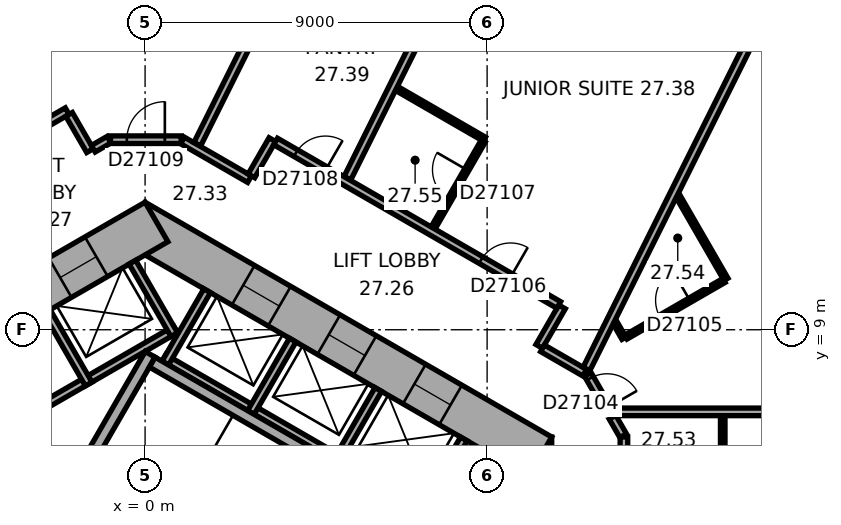
"""IFC4 building model, lengths in metres.
Left out: names, types, materials, properties, quantities, classifications, styles, units other than length and angle.
Written with IfcOpenShell. Run it as: python <this file> out.ifc"""

import sys

from ifc_helpers import new_model, si_unit, direction, frame, frame_2d, origin, place, context, subcontext, project, spatial, rectangle, extrude, element, fill, save


model = new_model("IFC4")
c1 = context("Model", 3, precision=1e-05, world=origin(), true_north=direction((0.0, 1.0)))
c2 = subcontext(c1, "Body", "Model", "MODEL_VIEW")
j1 = project(units=[si_unit("LENGTHUNIT", "METRE"), si_unit("PLANEANGLEUNIT", "RADIAN")], contexts=[c1])
p1 = place(None, origin())
s1 = spatial("IfcSite", under=j1, at=p1, CompositionType="ELEMENT")
p2 = place(p1, origin())
s2 = spatial("IfcBuilding", under=s1, at=p2, CompositionType="ELEMENT")
p3 = place(p2, frame((0.0, 0.0, 113.3)))
s3 = spatial("IfcBuildingStorey", under=s2, at=p3, CompositionType="ELEMENT", Elevation=113.3)
p4 = place(p3, frame((10.1, -6.177, 0.0), z_axis=(0.0, 0.0, 1.0), x_axis=(0.0, 1.0, 0.0)))
e1 = element("IfcWall", 1, at=p4, inside=s3, PredefinedType="SHEAR", context=c2, shape_type="SweptSolid", body=[
    extrude(rectangle(XDim=12.355, YDim=1.2, at=frame_2d((6.177, 0.0))), origin(), (0.0, 0.0, 1.0), 3.3),
])
p5 = place(p4, frame((6.378, 0.0, 0.0)))
e2 = element("IfcOpeningElement", 2, at=p5, cuts=e1, PredefinedType="OPENING", context=c2, shape_type="SweptSolid", body=[
    extrude(rectangle(XDim=1.5, YDim=2.1, at=frame_2d((0.75, 1.05))), frame((0.0, 0.61, 0.0), z_axis=(0.0, -1.0, 0.0), x_axis=(1.0, 0.0, 0.0)), (0.0, 0.0, 1.0), 1.22),
])
p6 = place(p4, frame((1.828, 0.0, 0.0)))
e3 = element("IfcOpeningElement", 3, at=p6, cuts=e1, PredefinedType="OPENING", context=c2, shape_type="SweptSolid", body=[
    extrude(rectangle(XDim=1.1, YDim=2.1, at=frame_2d((0.55, 1.05))), frame((0.0, 0.61, 0.0), z_axis=(0.0, -1.0, 0.0), x_axis=(1.0, 0.0, 0.0)), (0.0, 0.0, 1.0), 1.22),
])
p7 = place(p4, frame((4.427, 0.0, 0.0)))
e4 = element("IfcOpeningElement", 4, at=p7, cuts=e1, PredefinedType="OPENING", context=c2, shape_type="SweptSolid", body=[
    extrude(rectangle(XDim=1.1, YDim=2.1, at=frame_2d((0.55, 1.05))), frame((0.0, 0.61, 0.0), z_axis=(0.0, -1.0, 0.0), x_axis=(1.0, 0.0, 0.0)), (0.0, 0.0, 1.0), 1.22),
])
p8 = place(p3, frame((10.4, 5.658, 0.0), z_axis=(0.0, 0.0, 1.0), x_axis=(-0.866021384402, 0.500006961711, 0.0)))
e5 = element("IfcWall", 5, at=p8, inside=s3, PredefinedType="SHEAR", context=c2, shape_type="SweptSolid", body=[
    extrude(rectangle(XDim=12.355, YDim=1.2, at=frame_2d((6.178, 0.0))), origin(), (0.0, 0.0, 1.0), 3.3),
])
p9 = place(p8, frame((2.728, 0.0, 0.0)))
e6 = element("IfcOpeningElement", 6, at=p9, cuts=e5, PredefinedType="OPENING", context=c2, shape_type="SweptSolid", body=[
    extrude(rectangle(XDim=1.1, YDim=2.1, at=frame_2d((0.55, 1.05))), frame((0.0, 0.61, 0.0), z_axis=(0.0, -1.0, 0.0), x_axis=(1.0, 0.0, 0.0)), (0.0, 0.0, 1.0), 1.22),
])
p10 = place(p8, frame((5.328, 0.0, 0.0)))
e7 = element("IfcOpeningElement", 7, at=p10, cuts=e5, PredefinedType="OPENING", context=c2, shape_type="SweptSolid", body=[
    extrude(rectangle(XDim=1.1, YDim=2.1, at=frame_2d((0.55, 1.05))), frame((0.0, 0.61, 0.0), z_axis=(0.0, -1.0, 0.0), x_axis=(1.0, 0.0, 0.0)), (0.0, 0.0, 1.0), 1.22),
])
p11 = place(p8, frame((7.928, 0.0, 0.0)))
e8 = element("IfcOpeningElement", 8, at=p11, cuts=e5, PredefinedType="OPENING", context=c2, shape_type="SweptSolid", body=[
    extrude(rectangle(XDim=1.1, YDim=2.1, at=frame_2d((0.55, 1.05))), frame((0.0, 0.61, 0.0), z_axis=(0.0, -1.0, 0.0), x_axis=(1.0, 0.0, 0.0)), (0.0, 0.0, 1.0), 1.22),
])
p12 = place(p3, frame((0.3, 11.836, 0.0), z_axis=(0.0, 0.0, 1.0), x_axis=(-0.866021384402, -0.500006961711, 0.0)))
e9 = element("IfcWall", 9, at=p12, inside=s3, PredefinedType="SHEAR", context=c2, shape_type="SweptSolid", body=[
    extrude(rectangle(XDim=12.355, YDim=1.2, at=frame_2d((6.178, 0.0))), origin(), (0.0, 0.0, 1.0), 3.3),
])
p13 = place(p12, frame((6.378, 0.0, 0.0)))
e10 = element("IfcOpeningElement", 10, at=p13, cuts=e9, PredefinedType="OPENING", context=c2, shape_type="SweptSolid", body=[
    extrude(rectangle(XDim=1.5, YDim=2.1, at=frame_2d((0.75, 1.05))), frame((0.0, 0.61, 0.0), z_axis=(0.0, -1.0, 0.0), x_axis=(1.0, 0.0, 0.0)), (0.0, 0.0, 1.0), 1.22),
])
p14 = place(p12, frame((1.828, 0.0, 0.0)))
e11 = element("IfcOpeningElement", 11, at=p14, cuts=e9, PredefinedType="OPENING", context=c2, shape_type="SweptSolid", body=[
    extrude(rectangle(XDim=1.1, YDim=2.1, at=frame_2d((0.55, 1.05))), frame((0.0, 0.61, 0.0), z_axis=(0.0, -1.0, 0.0), x_axis=(1.0, 0.0, 0.0)), (0.0, 0.0, 1.0), 1.22),
])
p15 = place(p3, frame((20.63, 15.47, 0.0), z_axis=(0.0, 0.0, 1.0), x_axis=(-0.894934518609, 0.446197498203, 0.0)))
e12 = element("IfcWall", 12, at=p15, inside=s3, PredefinedType="STANDARD", context=c2, shape_type="SweptSolid", body=[
    extrude(rectangle(XDim=21.246, YDim=0.2, at=frame_2d((10.623, 0.0))), origin(), (0.0, 0.0, 1.0), 3.3),
])
p16 = place(p15, frame((1.553, 0.0, 0.8)))
e13 = element("IfcOpeningElement", 13, at=p16, cuts=e12, PredefinedType="OPENING", context=c2, shape_type="SweptSolid", body=[
    extrude(rectangle(XDim=2.4, YDim=1.7, at=frame_2d((1.2, 0.85))), frame((0.0, 0.11, 0.0), z_axis=(0.0, -1.0, 0.0), x_axis=(1.0, 0.0, 0.0)), (0.0, 0.0, 1.0), 0.22),
])
p17 = place(p15, frame((5.488, 0.0, 0.8)))
e14 = element("IfcOpeningElement", 14, at=p17, cuts=e12, PredefinedType="OPENING", context=c2, shape_type="SweptSolid", body=[
    extrude(rectangle(XDim=2.4, YDim=1.7, at=frame_2d((1.2, 0.85))), frame((0.0, 0.11, 0.0), z_axis=(0.0, -1.0, 0.0), x_axis=(1.0, 0.0, 0.0)), (0.0, 0.0, 1.0), 0.22),
])
p18 = place(p15, frame((9.422, 0.0, 0.8)))
e15 = element("IfcOpeningElement", 15, at=p18, cuts=e12, PredefinedType="OPENING", context=c2, shape_type="SweptSolid", body=[
    extrude(rectangle(XDim=2.4, YDim=1.7, at=frame_2d((1.2, 0.85))), frame((0.0, 0.11, 0.0), z_axis=(0.0, -1.0, 0.0), x_axis=(1.0, 0.0, 0.0)), (0.0, 0.0, 1.0), 0.22),
])
p19 = place(p15, frame((13.357, 0.0, 0.8)))
e16 = element("IfcOpeningElement", 16, at=p19, cuts=e12, PredefinedType="OPENING", context=c2, shape_type="SweptSolid", body=[
    extrude(rectangle(XDim=2.4, YDim=1.7, at=frame_2d((1.2, 0.85))), frame((0.0, 0.11, 0.0), z_axis=(0.0, -1.0, 0.0), x_axis=(1.0, 0.0, 0.0)), (0.0, 0.0, 1.0), 0.22),
])
p20 = place(p15, frame((17.292, 0.0, 0.8)))
e17 = element("IfcOpeningElement", 17, at=p20, cuts=e12, PredefinedType="OPENING", context=c2, shape_type="SweptSolid", body=[
    extrude(rectangle(XDim=2.4, YDim=1.7, at=frame_2d((1.2, 0.85))), frame((0.0, 0.11, 0.0), z_axis=(0.0, -1.0, 0.0), x_axis=(1.0, 0.0, 0.0)), (0.0, 0.0, 1.0), 0.22),
])
p21 = place(p3, frame((7.424, 4.259, 0.0), z_axis=(0.0, 0.0, 1.0), x_axis=(-0.866026010844, 0.49999894854, 0.0)))
e18 = element("IfcWall", 18, at=p21, inside=s3, PredefinedType="PARTITIONING", context=c2, shape_type="SweptSolid", body=[
    extrude(rectangle(XDim=8.0, YDim=0.2, at=frame_2d((4.0, 0.0))), origin(), (0.0, 0.0, 1.0), 3.05),
])
for number, where, z_axis, x_axis in (
    (19, (7.287, 4.222, 0.0), (0.0, 0.0, 1.0), (0.5, 0.866, 0.0)),
    (20, (5.036, 5.522, 0.0), (0.0, 0.0, 1.0), (0.5, 0.866, 0.0)),
    (21, (2.784, 6.822, 0.0), (0.0, 0.0, 1.0), (0.5, 0.866, 0.0)),
    (22, (0.532, 8.122, 0.0), (0.0, 0.0, 1.0), (0.5, 0.866, 0.0)),
):
    element("IfcWall", number, at=place(p3, frame(where, z_axis=z_axis, x_axis=x_axis)), inside=s3, PredefinedType="PARTITIONING", context=c2, shape_type="SweptSolid", body=[
        extrude(rectangle(XDim=2.2, YDim=0.2, at=frame_2d((1.1, 0.0))), origin(), (0.0, 0.0, 1.0), 3.05),
    ])
p22 = place(p3, frame((0.803, 9.009, 0.0), z_axis=(0.0, 0.0, 1.0), x_axis=(-0.866028230842, -0.499995103361, 0.0)))
e23 = element("IfcWall", 23, at=p22, inside=s3, PredefinedType="PARTITIONING", context=c2, shape_type="SweptSolid", body=[
    extrude(rectangle(XDim=5.4, YDim=0.2, at=frame_2d((2.7, 0.0))), origin(), (0.0, 0.0, 1.0), 3.05),
])
p23 = place(p3, frame((0.767, 8.872, 0.0), z_axis=(0.0, 0.0, 1.0), x_axis=(-0.499994660107, 0.866028486751, 0.0)))
e24 = element("IfcWall", 24, at=p23, inside=s3, PredefinedType="PARTITIONING", context=c2, shape_type="SweptSolid", body=[
    extrude(rectangle(XDim=2.2, YDim=0.2, at=frame_2d((1.1, 0.0))), origin(), (0.0, 0.0, 1.0), 3.05),
])
p24 = place(p3, frame((-1.485, 7.572, 0.0), z_axis=(0.0, 0.0, 1.0), x_axis=(-0.50002983664, 0.866008176907, 0.0)))
e25 = element("IfcWall", 25, at=p24, inside=s3, PredefinedType="PARTITIONING", context=c2, shape_type="SweptSolid", body=[
    extrude(rectangle(XDim=2.2, YDim=0.2, at=frame_2d((1.1, 0.0))), origin(), (0.0, 0.0, 1.0), 3.05),
])
p25 = place(p3, frame((-2.216, 4.282, 0.0), z_axis=(0.0, 0.0, 1.0), x_axis=(0.499977259774, 0.866038532462, 0.0)))
e26 = element("IfcWall", 26, at=p25, inside=s3, PredefinedType="SHEAR", context=c2, shape_type="SweptSolid", body=[
    extrude(rectangle(XDim=4.7, YDim=0.3, at=frame_2d((2.35, 0.0))), origin(), (0.0, 0.0, 1.0), 3.05),
])
p26 = place(p3, frame((6.303, 4.617, 0.0), z_axis=(0.0, 0.0, 1.0), x_axis=(-0.866027801685, 0.499995846692, 0.0)))
e27 = element("IfcWall", 27, at=p26, inside=s3, PredefinedType="SHEAR", context=c2, shape_type="SweptSolid", body=[
    extrude(rectangle(XDim=7.06, YDim=0.3, at=frame_2d((3.53, 0.0))), origin(), (0.0, 0.0, 1.0), 3.05),
])
p27 = place(p3, frame((-2.05, 14.752, 0.0), z_axis=(0.0, 0.0, 1.0), x_axis=(-0.866030936828, -0.499990416364, 0.0)))
e28 = element("IfcWall", 28, at=p27, inside=s3, PredefinedType="PARTITIONING", context=c2, shape_type="SweptSolid", body=[
    extrude(rectangle(XDim=3.102, YDim=0.2, at=frame_2d((1.551, 0.0))), origin(), (0.0, 0.0, 1.0), 3.05),
])
p28 = place(p3, frame((-1.449, 13.712, 0.0), z_axis=(0.0, 0.0, 1.0), x_axis=(-0.499978356969, 0.866037899034, 0.0)))
e29 = element("IfcWall", 29, at=p28, inside=s3, PredefinedType="PARTITIONING", context=c2, shape_type="SweptSolid", body=[
    extrude(rectangle(XDim=1.101, YDim=0.2, at=frame_2d((0.551, 0.0))), origin(), (0.0, 0.0, 1.0), 3.05),
])
p29 = place(p3, frame((-0.95, 14.001, 0.0), z_axis=(0.0, 0.0, 1.0), x_axis=(-0.86609177584, -0.499885022602, 0.0)))
e30 = element("IfcWall", 30, at=p29, inside=s3, PredefinedType="PARTITIONING", context=c2, shape_type="SweptSolid", body=[
    extrude(rectangle(XDim=0.477, YDim=0.2, at=frame_2d((0.238, 0.0))), origin(), (0.0, 0.0, 1.0), 3.05),
])
p30 = place(p3, frame((0.95, 14.001, 0.0), z_axis=(0.0, 0.0, 1.0), x_axis=(-1.0, 0.0, 0.0)))
e31 = element("IfcWall", 31, at=p30, inside=s3, PredefinedType="PARTITIONING", context=c2, shape_type="SweptSolid", body=[
    extrude(rectangle(XDim=1.86, YDim=0.2, at=frame_2d((0.93, 0.0))), origin(), (0.0, 0.0, 1.0), 3.05),
])
p31 = place(p30, frame((0.43, 0.0, 0.0)))
e32 = element("IfcOpeningElement", 32, at=p31, cuts=e31, PredefinedType="OPENING", context=c2, shape_type="SweptSolid", body=[
    extrude(rectangle(XDim=1.0, YDim=2.1, at=frame_2d((0.5, 1.05))), frame((0.0, 0.11, 0.0), z_axis=(0.0, -1.0, 0.0), x_axis=(1.0, 0.0, 0.0)), (0.0, 0.0, 1.0), 0.22),
])
p32 = place(p3, frame((2.748, 12.962, 0.0), z_axis=(0.0, 0.0, 1.0), x_axis=(-0.866013897511, 0.50001992892, 0.0)))
e33 = element("IfcWall", 33, at=p32, inside=s3, PredefinedType="PARTITIONING", context=c2, shape_type="SweptSolid", body=[
    extrude(rectangle(XDim=2.037, YDim=0.2, at=frame_2d((1.018, 0.0))), origin(), (0.0, 0.0, 1.0), 3.05),
])
p33 = place(p3, frame((3.349, 14.002, 0.0), z_axis=(0.0, 0.0, 1.0), x_axis=(-0.500074377092, -0.865982457891, 0.0)))
e34 = element("IfcWall", 34, at=p33, inside=s3, PredefinedType="PARTITIONING", context=c2, shape_type="SweptSolid", body=[
    extrude(rectangle(XDim=1.101, YDim=0.2, at=frame_2d((0.55, 0.0))), origin(), (0.0, 0.0, 1.0), 3.05),
])
p34 = place(p3, frame((5.351, 21.859, 0.0), z_axis=(0.0, 0.0, 1.0), x_axis=(-0.446205309328, -0.894930624086, 0.0)))
e35 = element("IfcWall", 35, at=p34, inside=s3, PredefinedType="PARTITIONING", context=c2, shape_type="SweptSolid", body=[
    extrude(rectangle(XDim=8.913, YDim=0.2, at=frame_2d((4.457, 0.0))), origin(), (0.0, 0.0, 1.0), 2.6),
])
p35 = place(p3, frame((6.614, 15.351, 0.0), z_axis=(0.0, 0.0, 1.0), x_axis=(0.866024262117, -0.500001977421, 0.0)))
e36 = element("IfcWall", 36, at=p35, inside=s3, PredefinedType="PARTITIONING", context=c2, shape_type="SweptSolid", body=[
    extrude(rectangle(XDim=2.671, YDim=0.12, at=frame_2d((1.336, 0.0))), origin(), (0.0, 0.0, 1.0), 3.05),
])
p36 = place(p3, frame((8.872, 20.104, 0.0), z_axis=(0.0, 0.0, 1.0), x_axis=(-0.446218378653, -0.894924107706, 0.0)))
e37 = element("IfcWall", 37, at=p36, inside=s3, PredefinedType="PARTITIONING", context=c2, shape_type="SweptSolid", body=[
    extrude(rectangle(XDim=7.95, YDim=0.2, at=frame_2d((3.975, 0.0))), origin(), (0.0, 0.0, 1.0), 3.05),
])
p37 = place(p3, frame((8.897, 13.963, 0.0), z_axis=(0.0, 0.0, 1.0), x_axis=(-0.500048002682, -0.865997687649, 0.0)))
e38 = element("IfcWall", 38, at=p37, inside=s3, PredefinedType="PARTITIONING", context=c2, shape_type="SweptSolid", body=[
    extrude(rectangle(XDim=2.64, YDim=0.12, at=frame_2d((1.32, 0.0))), origin(), (0.0, 0.0, 1.0), 2.6),
])
p38 = place(p37, frame((0.87, 0.0, 0.0)))
e39 = element("IfcOpeningElement", 39, at=p38, cuts=e38, PredefinedType="OPENING", context=c2, shape_type="SweptSolid", body=[
    extrude(rectangle(XDim=0.9, YDim=2.1, at=frame_2d((0.45, 1.05))), frame((0.0, 0.07, 0.0), z_axis=(0.0, -1.0, 0.0), x_axis=(1.0, 0.0, 0.0)), (0.0, 0.0, 1.0), 0.14),
])
p39 = place(p3, frame((10.371, 8.561, 0.0), z_axis=(0.0, 0.0, 1.0), x_axis=(0.499986357472, 0.866033280158, 0.0)))
e40 = element("IfcWall", 40, at=p39, inside=s3, PredefinedType="PARTITIONING", context=c2, shape_type="SweptSolid", body=[
    extrude(rectangle(XDim=1.201, YDim=0.2, at=frame_2d((0.601, 0.0))), origin(), (0.0, 0.0, 1.0), 3.05),
])
p40 = place(p3, frame((10.885, 9.652, 0.0), z_axis=(0.0, 0.0, 1.0), x_axis=(-0.866033868542, 0.499985338323, 0.0)))
e41 = element("IfcWall", 41, at=p40, inside=s3, PredefinedType="PARTITIONING", context=c2, shape_type="SweptSolid", body=[
    extrude(rectangle(XDim=8.602, YDim=0.2, at=frame_2d((4.301, 0.0))), origin(), (0.0, 0.0, 1.0), 3.05),
])
p41 = place(p40, frame((1.464, 0.0, 0.0)))
e42 = element("IfcOpeningElement", 42, at=p41, cuts=e41, PredefinedType="OPENING", context=c2, shape_type="SweptSolid", body=[
    extrude(rectangle(XDim=0.9, YDim=2.1, at=frame_2d((0.45, 1.05))), frame((0.0, 0.11, 0.0), z_axis=(0.0, -1.0, 0.0), x_axis=(1.0, 0.0, 0.0)), (0.0, 0.0, 1.0), 0.22),
])
p42 = place(p40, frame((7.09, 0.0, 0.0)))
e43 = element("IfcOpeningElement", 43, at=p42, cuts=e41, PredefinedType="OPENING", context=c2, shape_type="SweptSolid", body=[
    extrude(rectangle(XDim=0.9, YDim=2.1, at=frame_2d((0.45, 1.05))), frame((0.0, 0.11, 0.0), z_axis=(0.0, -1.0, 0.0), x_axis=(1.0, 0.0, 0.0)), (0.0, 0.0, 1.0), 0.22),
])
p43 = place(p3, frame((11.566, 7.871, 0.0), z_axis=(0.0, 0.0, 1.0), x_axis=(-0.866004557827, 0.500036104519, 0.0)))
e44 = element("IfcWall", 44, at=p43, inside=s3, PredefinedType="PARTITIONING", context=c2, shape_type="SweptSolid", body=[
    extrude(rectangle(XDim=1.28, YDim=0.2, at=frame_2d((0.64, 0.0))), origin(), (0.0, 0.0, 1.0), 3.05),
])
p44 = place(p3, frame((12.218, 6.839, 0.0), z_axis=(0.0, 0.0, 1.0), x_axis=(-0.500044870432, 0.865999496279, 0.0)))
e45 = element("IfcWall", 45, at=p44, inside=s3, PredefinedType="PARTITIONING", context=c2, shape_type="SweptSolid", body=[
    extrude(rectangle(XDim=1.136, YDim=0.2, at=frame_2d((0.568, 0.0))), origin(), (0.0, 0.0, 1.0), 3.05),
])
p45 = place(p44, frame((0.118, 0.0, 0.0)))
e46 = element("IfcOpeningElement", 46, at=p45, cuts=e45, PredefinedType="OPENING", context=c2, shape_type="SweptSolid", body=[
    extrude(rectangle(XDim=0.9, YDim=2.1, at=frame_2d((0.45, 1.05))), frame((0.0, 0.11, 0.0), z_axis=(0.0, -1.0, 0.0), x_axis=(1.0, 0.0, 0.0)), (0.0, 0.0, 1.0), 0.22),
])
p46 = place(p3, frame((12.58, 6.212, 0.0), z_axis=(0.0, 0.0, 1.0), x_axis=(-0.499936258447, 0.86606220186, 0.0)))
e47 = element("IfcWall", 47, at=p46, inside=s3, PredefinedType="PARTITIONING", context=c2, shape_type="SweptSolid", body=[
    extrude(rectangle(XDim=0.56, YDim=0.2, at=frame_2d((0.28, 0.0))), origin(), (0.0, 0.0, 1.0), 3.05),
])
p47 = place(p3, frame((12.6, 3.004, 0.0), z_axis=(0.0, 0.0, 1.0), x_axis=(0.0, 1.0, 0.0)))
e48 = element("IfcWall", 48, at=p47, inside=s3, PredefinedType="PARTITIONING", context=c2, shape_type="SweptSolid", body=[
    extrude(rectangle(XDim=3.173, YDim=0.2, at=frame_2d((1.586, 0.0))), origin(), (0.0, 0.0, 1.0), 3.05),
])
p48 = place(p47, frame((0.225, 0.0, 0.0)))
e49 = element("IfcOpeningElement", 49, at=p48, cuts=e48, PredefinedType="OPENING", context=c2, shape_type="SweptSolid", body=[
    extrude(rectangle(XDim=0.9, YDim=2.1, at=frame_2d((0.45, 1.05))), frame((0.0, 0.11, 0.0), z_axis=(0.0, -1.0, 0.0), x_axis=(1.0, 0.0, 0.0)), (0.0, 0.0, 1.0), 0.22),
])
p49 = place(p3, frame((12.601, 8.776, 0.0), z_axis=(0.0, 0.0, 1.0), x_axis=(-0.500166486798, 0.865929261247, 0.0)))
e50 = element("IfcWall", 50, at=p49, inside=s3, PredefinedType="PARTITIONING", context=c2, shape_type="SweptSolid", body=[
    extrude(rectangle(XDim=0.476, YDim=0.12, at=frame_2d((0.238, 0.0))), origin(), (0.0, 0.0, 1.0), 3.05),
])
p50 = place(p3, frame((14.022, 12.515, 0.0), z_axis=(0.0, 0.0, 1.0), x_axis=(0.499962146402, -0.866047257466, 0.0)))
e51 = element("IfcWall", 51, at=p50, inside=s3, PredefinedType="PARTITIONING", context=c2, shape_type="SweptSolid", body=[
    extrude(rectangle(XDim=2.528, YDim=0.12, at=frame_2d((1.264, 0.0))), origin(), (0.0, 0.0, 1.0), 3.05),
])
p51 = place(p3, frame((15.2, 6.739, 0.0), z_axis=(0.0, 0.0, 1.0), x_axis=(0.0, -1.0, 0.0)))
e52 = element("IfcWall", 52, at=p51, inside=s3, PredefinedType="PARTITIONING", context=c2, shape_type="SweptSolid", body=[
    extrude(rectangle(XDim=2.274, YDim=0.12, at=frame_2d((1.137, 0.0))), origin(), (0.0, 0.0, 1.0), 3.05),
])
p52 = place(p3, frame((15.233, 10.296, 0.0), z_axis=(0.0, 0.0, 1.0), x_axis=(-0.866010940986, -0.500025049464, 0.0)))
e53 = element("IfcWall", 53, at=p52, inside=s3, PredefinedType="PARTITIONING", context=c2, shape_type="SweptSolid", body=[
    extrude(rectangle(XDim=2.98, YDim=0.12, at=frame_2d((1.49, 0.0))), origin(), (0.0, 0.0, 1.0), 3.05),
])
p53 = place(p52, frame((1.04, 0.0, 0.0)))
e54 = element("IfcOpeningElement", 54, at=p53, cuts=e53, PredefinedType="OPENING", context=c2, shape_type="SweptSolid", body=[
    extrude(rectangle(XDim=0.9, YDim=2.1, at=frame_2d((0.45, 1.05))), frame((0.0, 0.07, 0.0), z_axis=(0.0, -1.0, 0.0), x_axis=(1.0, 0.0, 0.0)), (0.0, 0.0, 1.0), 0.14),
])
p54 = place(p3, frame((15.915, 16.592, 0.0), z_axis=(0.0, 0.0, 1.0), x_axis=(-0.446199736347, -0.894933402709, 0.0)))
e55 = element("IfcWall", 55, at=p54, inside=s3, PredefinedType="PARTITIONING", context=c2, shape_type="SweptSolid", body=[
    extrude(rectangle(XDim=9.635, YDim=0.2, at=frame_2d((4.817, 0.0))), origin(), (0.0, 0.0, 1.0), 3.05),
])
p55 = place(p3, frame((21.95, 6.839, 0.0), z_axis=(0.0, 0.0, 1.0), x_axis=(-1.0, 0.0, 0.0)))
e56 = element("IfcWall", 56, at=p55, inside=s3, PredefinedType="PARTITIONING", context=c2, shape_type="SweptSolid", body=[
    extrude(rectangle(XDim=9.65, YDim=0.2, at=frame_2d((4.825, 0.0))), origin(), (0.0, 0.0, 1.0), 3.05),
])
p56 = place(p9, origin())
e57 = element("IfcDoor", 57, at=p56, inside=s3, OperationType="DOUBLE_DOOR_SLIDING", PredefinedType="DOOR", context=c2, shape_type="SweptSolid", body=[
    extrude(rectangle(XDim=1.1, YDim=2.1, at=frame_2d((0.55, 1.05))), frame((0.0, 0.025, 0.0), z_axis=(0.0, -1.0, 0.0), x_axis=(1.0, 0.0, 0.0)), (0.0, 0.0, 1.0), 0.05),
])
fill(e6, e57)
p57 = place(p10, origin())
e58 = element("IfcDoor", 58, at=p57, inside=s3, OperationType="DOUBLE_DOOR_SLIDING", PredefinedType="DOOR", context=c2, shape_type="SweptSolid", body=[
    extrude(rectangle(XDim=1.1, YDim=2.1, at=frame_2d((0.55, 1.05))), frame((0.0, 0.025, 0.0), z_axis=(0.0, -1.0, 0.0), x_axis=(1.0, 0.0, 0.0)), (0.0, 0.0, 1.0), 0.05),
])
fill(e7, e58)
p58 = place(p11, origin())
e59 = element("IfcDoor", 59, at=p58, inside=s3, OperationType="DOUBLE_DOOR_SLIDING", PredefinedType="DOOR", context=c2, shape_type="SweptSolid", body=[
    extrude(rectangle(XDim=1.1, YDim=2.1, at=frame_2d((0.55, 1.05))), frame((0.0, 0.025, 0.0), z_axis=(0.0, -1.0, 0.0), x_axis=(1.0, 0.0, 0.0)), (0.0, 0.0, 1.0), 0.05),
])
fill(e8, e59)
p59 = place(p14, origin())
e60 = element("IfcDoor", 60, at=p59, inside=s3, OperationType="DOUBLE_DOOR_SLIDING", PredefinedType="DOOR", context=c2, shape_type="SweptSolid", body=[
    extrude(rectangle(XDim=1.1, YDim=2.1, at=frame_2d((0.55, 1.05))), frame((0.0, 0.025, 0.0), z_axis=(0.0, -1.0, 0.0), x_axis=(1.0, 0.0, 0.0)), (0.0, 0.0, 1.0), 0.05),
])
fill(e11, e60)
p60 = place(p45, origin())
e61 = element("IfcDoor", 61, at=p60, inside=s3, OperationType="SINGLE_SWING_LEFT", PredefinedType="DOOR", context=c2, shape_type="SweptSolid", body=[
    extrude(rectangle(XDim=0.9, YDim=2.1, at=frame_2d((0.45, 1.05))), frame((0.0, 0.025, 0.0), z_axis=(0.0, -1.0, 0.0), x_axis=(1.0, 0.0, 0.0)), (0.0, 0.0, 1.0), 0.05),
])
fill(e46, e61)
p61 = place(p53, origin())
e62 = element("IfcDoor", 62, at=p61, inside=s3, OperationType="SINGLE_SWING_LEFT", PredefinedType="DOOR", context=c2, shape_type="SweptSolid", body=[
    extrude(rectangle(XDim=0.9, YDim=2.1, at=frame_2d((0.45, 1.05))), frame((0.0, 0.025, 0.0), z_axis=(0.0, -1.0, 0.0), x_axis=(1.0, 0.0, 0.0)), (0.0, 0.0, 1.0), 0.05),
])
fill(e54, e62)
p62 = place(p41, origin())
e63 = element("IfcDoor", 63, at=p62, inside=s3, OperationType="SINGLE_SWING_LEFT", PredefinedType="DOOR", context=c2, shape_type="SweptSolid", body=[
    extrude(rectangle(XDim=0.9, YDim=2.1, at=frame_2d((0.45, 1.05))), frame((0.0, 0.025, 0.0), z_axis=(0.0, -1.0, 0.0), x_axis=(1.0, 0.0, 0.0)), (0.0, 0.0, 1.0), 0.05),
])
fill(e42, e63)
p63 = place(p38, origin())
e64 = element("IfcDoor", 64, at=p63, inside=s3, OperationType="SINGLE_SWING_LEFT", PredefinedType="DOOR", context=c2, shape_type="SweptSolid", body=[
    extrude(rectangle(XDim=0.9, YDim=2.1, at=frame_2d((0.45, 1.05))), frame((0.0, 0.025, 0.0), z_axis=(0.0, -1.0, 0.0), x_axis=(1.0, 0.0, 0.0)), (0.0, 0.0, 1.0), 0.05),
])
fill(e39, e64)
p64 = place(p42, origin())
e65 = element("IfcDoor", 65, at=p64, inside=s3, OperationType="SINGLE_SWING_LEFT", PredefinedType="DOOR", context=c2, shape_type="SweptSolid", body=[
    extrude(rectangle(XDim=0.9, YDim=2.1, at=frame_2d((0.45, 1.05))), frame((0.0, 0.025, 0.0), z_axis=(0.0, -1.0, 0.0), x_axis=(1.0, 0.0, 0.0)), (0.0, 0.0, 1.0), 0.05),
])
fill(e43, e65)
p65 = place(p31, origin())
e66 = element("IfcDoor", 66, at=p65, inside=s3, OperationType="SINGLE_SWING_LEFT", PredefinedType="DOOR", context=c2, shape_type="SweptSolid", body=[
    extrude(rectangle(XDim=1.0, YDim=2.1, at=frame_2d((0.5, 1.05))), frame((0.0, 0.025, 0.0), z_axis=(0.0, -1.0, 0.0), x_axis=(1.0, 0.0, 0.0)), (0.0, 0.0, 1.0), 0.05),
])
fill(e32, e66)
save(model, sys.argv[1])
